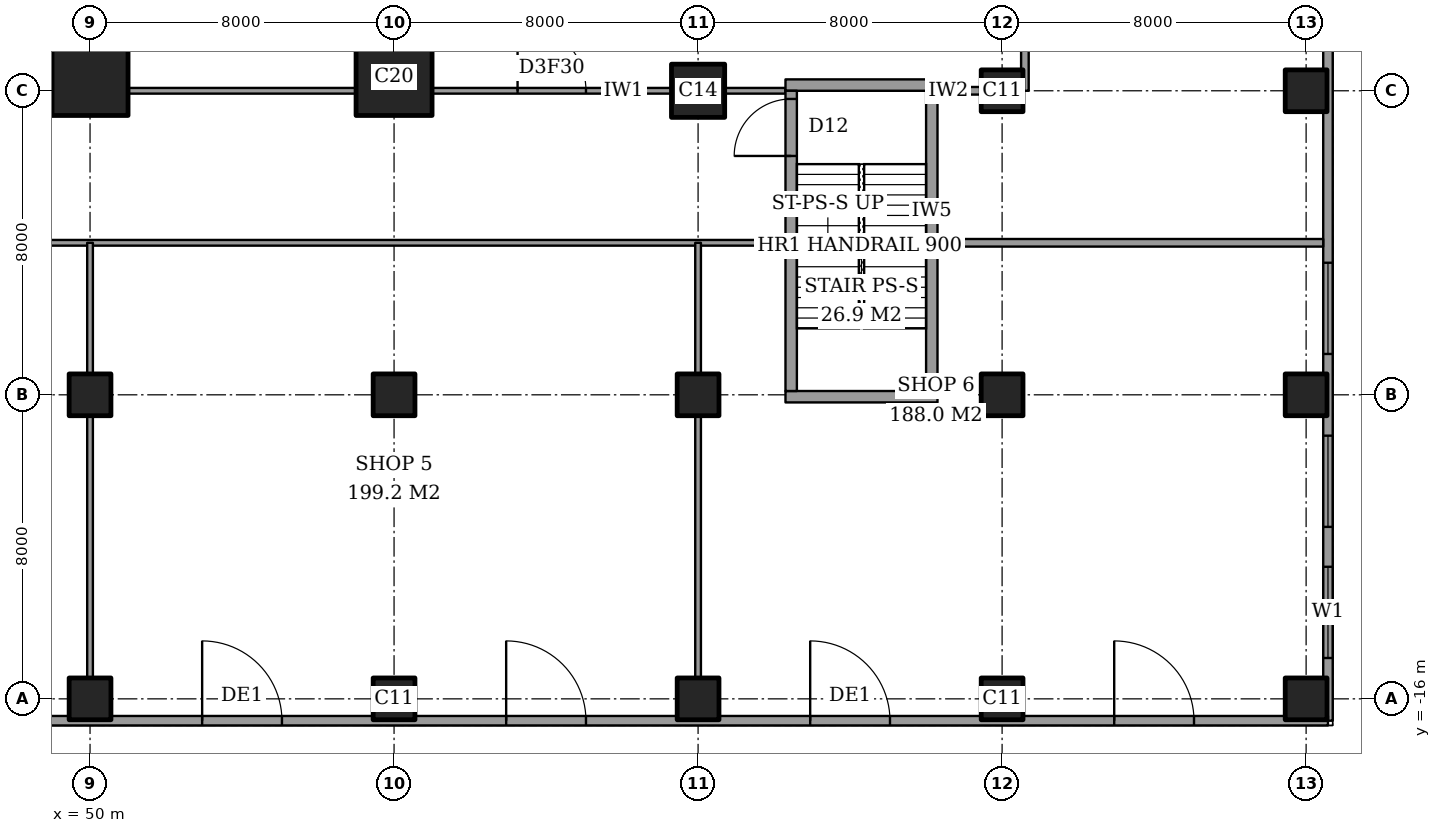
"""IFC4 building model, lengths in metres.
Left out: names, types, materials, properties, quantities, classifications, styles, units other than length and angle.
Written with IfcOpenShell. Run it as: python <this file> out.ifc"""

import sys

from ifc_helpers import new_model, si_unit, direction, frame, frame_2d, origin, origin_2d, place, context, subcontext, project, spatial, rectangle, extrude, element, fill, save


model = new_model("IFC4")
c1 = context("Model", 3, precision=1e-05, world=origin(), true_north=direction((0.0, 1.0)))
c2 = subcontext(c1, "Body", "Model", "MODEL_VIEW")
j1 = project(units=[si_unit("LENGTHUNIT", "METRE"), si_unit("PLANEANGLEUNIT", "RADIAN")], contexts=[c1])
p1 = place(None, origin())
s1 = spatial("IfcSite", under=j1, at=p1, CompositionType="ELEMENT")
p2 = place(p1, origin())
s2 = spatial("IfcBuilding", under=s1, at=p2, CompositionType="ELEMENT")
p3 = place(p2, origin())
s3 = spatial("IfcBuildingStorey", under=s2, at=p3, CompositionType="ELEMENT", Elevation=0.0)
for number, where, z_axis, x_axis in (
    (1, (50.0, -16.0, 0.0), (0.0, 0.0, 1.0), (1.0, 0.0, 0.0)),
    (2, (50.0, -8.0, 0.0), (0.0, 0.0, 1.0), (1.0, 0.0, 0.0)),
):
    element("IfcColumn", number, at=place(p3, frame(where, z_axis=z_axis, x_axis=x_axis)), inside=s3, PredefinedType="COLUMN", context=c2, shape_type="SweptSolid", body=[
        extrude(rectangle(XDim=1.1, YDim=1.1, at=origin_2d()), origin(), (0.0, 0.0, 1.0), 6.0),
    ])
p4 = place(p3, frame((50.0, 0.35, 0.0), z_axis=(0.0, 0.0, 1.0), x_axis=(1.0, 0.0, 0.0)))
e3 = element("IfcColumn", 3, at=p4, inside=s3, PredefinedType="COLUMN", context=c2, shape_type="SweptSolid", body=[
    extrude(rectangle(XDim=2.0, YDim=2.0, at=origin_2d()), origin(), (0.0, 0.0, 1.0), 6.0),
])
for number, where, z_axis, x_axis in (
    (4, (58.0, -16.0, 0.0), (0.0, 0.0, 1.0), (1.0, 0.0, 0.0)),
    (5, (58.0, -8.0, 0.0), (0.0, 0.0, 1.0), (1.0, 0.0, 0.0)),
):
    element("IfcColumn", number, at=place(p3, frame(where, z_axis=z_axis, x_axis=x_axis)), inside=s3, PredefinedType="COLUMN", context=c2, shape_type="SweptSolid", body=[
        extrude(rectangle(XDim=1.1, YDim=1.1, at=origin_2d()), origin(), (0.0, 0.0, 1.0), 6.0),
    ])
p5 = place(p3, frame((58.0, 0.35, 0.0), z_axis=(0.0, 0.0, 1.0), x_axis=(1.0, 0.0, 0.0)))
e6 = element("IfcColumn", 6, at=p5, inside=s3, PredefinedType="COLUMN", context=c2, shape_type="SweptSolid", body=[
    extrude(rectangle(XDim=2.0, YDim=2.0, at=origin_2d()), origin(), (0.0, 0.0, 1.0), 6.0),
])
for number, where, z_axis, x_axis in (
    (7, (66.0, -16.0, 0.0), (0.0, 0.0, 1.0), (1.0, 0.0, 0.0)),
    (8, (66.0, -8.0, 0.0), (0.0, 0.0, 1.0), (1.0, 0.0, 0.0)),
):
    element("IfcColumn", number, at=place(p3, frame(where, z_axis=z_axis, x_axis=x_axis)), inside=s3, PredefinedType="COLUMN", context=c2, shape_type="SweptSolid", body=[
        extrude(rectangle(XDim=1.1, YDim=1.1, at=origin_2d()), origin(), (0.0, 0.0, 1.0), 6.0),
    ])
p6 = place(p3, frame((66.0, 0.0, 0.0), z_axis=(0.0, 0.0, 1.0), x_axis=(1.0, 0.0, 0.0)))
e9 = element("IfcColumn", 9, at=p6, inside=s3, PredefinedType="COLUMN", context=c2, shape_type="SweptSolid", body=[
    extrude(rectangle(XDim=1.4, YDim=1.4, at=origin_2d()), origin(), (0.0, 0.0, 1.0), 6.0),
])
for number, where, z_axis, x_axis in (
    (10, (74.0, -16.0, 0.0), (0.0, 0.0, 1.0), (1.0, 0.0, 0.0)),
    (11, (74.0, -8.0, 0.0), (0.0, 0.0, 1.0), (1.0, 0.0, 0.0)),
    (12, (74.0, 0.0, 0.0), (0.0, 0.0, 1.0), (1.0, 0.0, 0.0)),
    (13, (82.0, -16.0, 0.0), (0.0, 0.0, 1.0), (1.0, 0.0, 0.0)),
    (14, (82.0, -8.0, 0.0), (0.0, 0.0, 1.0), (1.0, 0.0, 0.0)),
    (15, (82.0, 0.0, 0.0), (0.0, 0.0, 1.0), (1.0, 0.0, 0.0)),
):
    element("IfcColumn", number, at=place(p3, frame(where, z_axis=z_axis, x_axis=x_axis)), inside=s3, PredefinedType="COLUMN", context=c2, shape_type="SweptSolid", body=[
        extrude(rectangle(XDim=1.1, YDim=1.1, at=origin_2d()), origin(), (0.0, 0.0, 1.0), 6.0),
    ])
p7 = place(p3, frame((82.575, -16.575, 0.0), z_axis=(0.0, 0.0, 1.0), x_axis=(0.0, 1.0, 0.0)))
e16 = element("IfcWall", 16, at=p7, inside=s3, PredefinedType="SOLIDWALL", context=c2, shape_type="SweptSolid", body=[
    extrude(rectangle(XDim=52.45, YDim=0.25, at=frame_2d((26.225, 0.0))), origin(), (0.0, 0.0, 1.0), 6.0),
])
p8 = place(p7, frame((1.65, 0.0, 0.3)))
e17 = element("IfcOpeningElement", 17, at=p8, cuts=e16, PredefinedType="OPENING", context=c2, shape_type="SweptSolid", body=[
    extrude(rectangle(XDim=2.4, YDim=3.6, at=frame_2d((1.2, 1.8))), frame((0.0, 0.135, 0.0), z_axis=(0.0, -1.0, 0.0), x_axis=(1.0, 0.0, 0.0)), (0.0, 0.0, 1.0), 0.27),
])
p9 = place(p7, frame((5.1, 0.0, 0.3)))
e18 = element("IfcOpeningElement", 18, at=p9, cuts=e16, PredefinedType="OPENING", context=c2, shape_type="SweptSolid", body=[
    extrude(rectangle(XDim=2.4, YDim=3.6, at=frame_2d((1.2, 1.8))), frame((0.0, 0.135, 0.0), z_axis=(0.0, -1.0, 0.0), x_axis=(1.0, 0.0, 0.0)), (0.0, 0.0, 1.0), 0.27),
])
p10 = place(p7, frame((9.65, 0.0, 0.3)))
e19 = element("IfcOpeningElement", 19, at=p10, cuts=e16, PredefinedType="OPENING", context=c2, shape_type="SweptSolid", body=[
    extrude(rectangle(XDim=2.4, YDim=3.6, at=frame_2d((1.2, 1.8))), frame((0.0, 0.135, 0.0), z_axis=(0.0, -1.0, 0.0), x_axis=(1.0, 0.0, 0.0)), (0.0, 0.0, 1.0), 0.27),
])
p11 = place(p3, frame((-16.575, -16.575, 0.0), z_axis=(0.0, 0.0, 1.0), x_axis=(1.0, 0.0, 0.0)))
e20 = element("IfcWall", 20, at=p11, inside=s3, PredefinedType="SOLIDWALL", context=c2, shape_type="SweptSolid", body=[
    extrude(rectangle(XDim=99.15, YDim=0.25, at=frame_2d((49.575, 0.0))), origin(), (0.0, 0.0, 1.0), 6.0),
])
p12 = place(p11, frame((3.525, 0.0, 0.0)))
e21 = element("IfcOpeningElement", 21, at=p12, cuts=e20, PredefinedType="OPENING", context=c2, shape_type="SweptSolid", body=[
    extrude(rectangle(XDim=2.1, YDim=2.4, at=frame_2d((1.05, 1.2))), frame((0.0, 0.135, 0.0), z_axis=(0.0, -1.0, 0.0), x_axis=(1.0, 0.0, 0.0)), (0.0, 0.0, 1.0), 0.27),
])
p13 = place(p11, frame((11.525, 0.0, 0.0)))
e22 = element("IfcOpeningElement", 22, at=p13, cuts=e20, PredefinedType="OPENING", context=c2, shape_type="SweptSolid", body=[
    extrude(rectangle(XDim=2.1, YDim=2.4, at=frame_2d((1.05, 1.2))), frame((0.0, 0.135, 0.0), z_axis=(0.0, -1.0, 0.0), x_axis=(1.0, 0.0, 0.0)), (0.0, 0.0, 1.0), 0.27),
])
p14 = place(p11, frame((19.525, 0.0, 0.0)))
e23 = element("IfcOpeningElement", 23, at=p14, cuts=e20, PredefinedType="OPENING", context=c2, shape_type="SweptSolid", body=[
    extrude(rectangle(XDim=2.1, YDim=2.4, at=frame_2d((1.05, 1.2))), frame((0.0, 0.135, 0.0), z_axis=(0.0, -1.0, 0.0), x_axis=(1.0, 0.0, 0.0)), (0.0, 0.0, 1.0), 0.27),
])
p15 = place(p11, frame((27.525, 0.0, 0.0)))
e24 = element("IfcOpeningElement", 24, at=p15, cuts=e20, PredefinedType="OPENING", context=c2, shape_type="SweptSolid", body=[
    extrude(rectangle(XDim=2.1, YDim=2.4, at=frame_2d((1.05, 1.2))), frame((0.0, 0.135, 0.0), z_axis=(0.0, -1.0, 0.0), x_axis=(1.0, 0.0, 0.0)), (0.0, 0.0, 1.0), 0.27),
])
p16 = place(p11, frame((35.525, 0.0, 0.0)))
e25 = element("IfcOpeningElement", 25, at=p16, cuts=e20, PredefinedType="OPENING", context=c2, shape_type="SweptSolid", body=[
    extrude(rectangle(XDim=2.1, YDim=2.4, at=frame_2d((1.05, 1.2))), frame((0.0, 0.135, 0.0), z_axis=(0.0, -1.0, 0.0), x_axis=(1.0, 0.0, 0.0)), (0.0, 0.0, 1.0), 0.27),
])
p17 = place(p11, frame((44.025, 0.0, 0.0)))
e26 = element("IfcOpeningElement", 26, at=p17, cuts=e20, PredefinedType="OPENING", context=c2, shape_type="SweptSolid", body=[
    extrude(rectangle(XDim=2.1, YDim=2.4, at=frame_2d((1.05, 1.2))), frame((0.0, 0.135, 0.0), z_axis=(0.0, -1.0, 0.0), x_axis=(1.0, 0.0, 0.0)), (0.0, 0.0, 1.0), 0.27),
])
p18 = place(p11, frame((42.5, 0.0, 0.3)))
e27 = element("IfcOpeningElement", 27, at=p18, cuts=e20, PredefinedType="OPENING", context=c2, shape_type="SweptSolid", body=[
    extrude(rectangle(XDim=1.2, YDim=3.6, at=frame_2d((0.6, 1.8))), frame((0.0, 0.135, 0.0), z_axis=(0.0, -1.0, 0.0), x_axis=(1.0, 0.0, 0.0)), (0.0, 0.0, 1.0), 0.27),
])
p19 = place(p11, frame((46.45, 0.0, 0.3)))
e28 = element("IfcOpeningElement", 28, at=p19, cuts=e20, PredefinedType="OPENING", context=c2, shape_type="SweptSolid", body=[
    extrude(rectangle(XDim=1.2, YDim=3.6, at=frame_2d((0.6, 1.8))), frame((0.0, 0.135, 0.0), z_axis=(0.0, -1.0, 0.0), x_axis=(1.0, 0.0, 0.0)), (0.0, 0.0, 1.0), 0.27),
])
p20 = place(p11, frame((53.025, 0.0, 0.0)))
e29 = element("IfcOpeningElement", 29, at=p20, cuts=e20, PredefinedType="OPENING", context=c2, shape_type="SweptSolid", body=[
    extrude(rectangle(XDim=2.1, YDim=2.4, at=frame_2d((1.05, 1.2))), frame((0.0, 0.135, 0.0), z_axis=(0.0, -1.0, 0.0), x_axis=(1.0, 0.0, 0.0)), (0.0, 0.0, 1.0), 0.27),
])
p21 = place(p11, frame((61.525, 0.0, 0.0)))
e30 = element("IfcOpeningElement", 30, at=p21, cuts=e20, PredefinedType="OPENING", context=c2, shape_type="SweptSolid", body=[
    extrude(rectangle(XDim=2.1, YDim=2.4, at=frame_2d((1.05, 1.2))), frame((0.0, 0.135, 0.0), z_axis=(0.0, -1.0, 0.0), x_axis=(1.0, 0.0, 0.0)), (0.0, 0.0, 1.0), 0.27),
])
p22 = place(p11, frame((51.5, 0.0, 0.3)))
e31 = element("IfcOpeningElement", 31, at=p22, cuts=e20, PredefinedType="OPENING", context=c2, shape_type="SweptSolid", body=[
    extrude(rectangle(XDim=1.2, YDim=3.6, at=frame_2d((0.6, 1.8))), frame((0.0, 0.135, 0.0), z_axis=(0.0, -1.0, 0.0), x_axis=(1.0, 0.0, 0.0)), (0.0, 0.0, 1.0), 0.27),
])
p23 = place(p11, frame((55.45, 0.0, 0.3)))
e32 = element("IfcOpeningElement", 32, at=p23, cuts=e20, PredefinedType="OPENING", context=c2, shape_type="SweptSolid", body=[
    extrude(rectangle(XDim=1.2, YDim=3.6, at=frame_2d((0.6, 1.8))), frame((0.0, 0.135, 0.0), z_axis=(0.0, -1.0, 0.0), x_axis=(1.0, 0.0, 0.0)), (0.0, 0.0, 1.0), 0.27),
])
p24 = place(p11, frame((69.525, 0.0, 0.0)))
e33 = element("IfcOpeningElement", 33, at=p24, cuts=e20, PredefinedType="OPENING", context=c2, shape_type="SweptSolid", body=[
    extrude(rectangle(XDim=2.1, YDim=2.4, at=frame_2d((1.05, 1.2))), frame((0.0, 0.135, 0.0), z_axis=(0.0, -1.0, 0.0), x_axis=(1.0, 0.0, 0.0)), (0.0, 0.0, 1.0), 0.27),
])
p25 = place(p11, frame((77.525, 0.0, 0.0)))
e34 = element("IfcOpeningElement", 34, at=p25, cuts=e20, PredefinedType="OPENING", context=c2, shape_type="SweptSolid", body=[
    extrude(rectangle(XDim=2.1, YDim=2.4, at=frame_2d((1.05, 1.2))), frame((0.0, 0.135, 0.0), z_axis=(0.0, -1.0, 0.0), x_axis=(1.0, 0.0, 0.0)), (0.0, 0.0, 1.0), 0.27),
])
p26 = place(p11, frame((85.525, 0.0, 0.0)))
e35 = element("IfcOpeningElement", 35, at=p26, cuts=e20, PredefinedType="OPENING", context=c2, shape_type="SweptSolid", body=[
    extrude(rectangle(XDim=2.1, YDim=2.4, at=frame_2d((1.05, 1.2))), frame((0.0, 0.135, 0.0), z_axis=(0.0, -1.0, 0.0), x_axis=(1.0, 0.0, 0.0)), (0.0, 0.0, 1.0), 0.27),
])
p27 = place(p11, frame((93.525, 0.0, 0.0)))
e36 = element("IfcOpeningElement", 36, at=p27, cuts=e20, PredefinedType="OPENING", context=c2, shape_type="SweptSolid", body=[
    extrude(rectangle(XDim=2.1, YDim=2.4, at=frame_2d((1.05, 1.2))), frame((0.0, 0.135, 0.0), z_axis=(0.0, -1.0, 0.0), x_axis=(1.0, 0.0, 0.0)), (0.0, 0.0, 1.0), 0.27),
])
p28 = place(p3, frame((72.3, -4.0, 0.0), z_axis=(0.0, 0.0, 1.0), x_axis=(1.0, 0.0, 0.0)))
e37 = element("IfcWall", 37, at=p28, inside=s3, PredefinedType="PARTITIONING", context=c2, shape_type="SweptSolid", body=[
    extrude(rectangle(XDim=10.15, YDim=0.2, at=frame_2d((5.075, 0.0))), origin(), (0.0, 0.0, 1.0), 5.7),
])
p29 = place(p3, frame((-16.45, -4.0, 0.0), z_axis=(0.0, 0.0, 1.0), x_axis=(1.0, 0.0, 0.0)))
e38 = element("IfcWall", 38, at=p29, inside=s3, PredefinedType="PARTITIONING", context=c2, shape_type="SweptSolid", body=[
    extrude(rectangle(XDim=84.75, YDim=0.15, at=frame_2d((42.375, 0.0))), origin(), (0.0, 0.0, 1.0), 5.7),
])
p30 = place(p3, frame((72.3, 0.0, 0.0), z_axis=(0.0, 0.0, 1.0), x_axis=(1.0, 0.0, 0.0)))
e39 = element("IfcWall", 39, at=p30, inside=s3, PredefinedType="PARTITIONING", context=c2, shape_type="SweptSolid", body=[
    extrude(rectangle(XDim=1.15, YDim=0.2, at=frame_2d((0.575, 0.0))), origin(), (0.0, 0.0, 1.0), 5.7),
])
p31 = place(p3, frame((51.0, 0.0, 0.0), z_axis=(0.0, 0.0, 1.0), x_axis=(1.0, 0.0, 0.0)))
e40 = element("IfcWall", 40, at=p31, inside=s3, PredefinedType="PARTITIONING", context=c2, shape_type="SweptSolid", body=[
    extrude(rectangle(XDim=6.0, YDim=0.15, at=frame_2d((3.0, 0.0))), origin(), (0.0, 0.0, 1.0), 4.3),
])
p32 = place(p3, frame((59.0, 0.0, 0.0), z_axis=(0.0, 0.0, 1.0), x_axis=(1.0, 0.0, 0.0)))
e41 = element("IfcWall", 41, at=p32, inside=s3, PredefinedType="PARTITIONING", context=c2, shape_type="SweptSolid", body=[
    extrude(rectangle(XDim=6.3, YDim=0.15, at=frame_2d((3.15, 0.0))), origin(), (0.0, 0.0, 1.0), 4.3),
])
p33 = place(p32, frame((2.25, 0.0, 0.0)))
e42 = element("IfcOpeningElement", 42, at=p33, cuts=e41, PredefinedType="OPENING", context=c2, shape_type="SweptSolid", body=[
    extrude(rectangle(XDim=1.8, YDim=2.1, at=frame_2d((0.9, 1.05))), frame((0.0, 0.085, 0.0), z_axis=(0.0, -1.0, 0.0), x_axis=(1.0, 0.0, 0.0)), (0.0, 0.0, 1.0), 0.17),
])
p34 = place(p3, frame((66.7, 0.0, 0.0), z_axis=(0.0, 0.0, 1.0), x_axis=(1.0, 0.0, 0.0)))
e43 = element("IfcWall", 43, at=p34, inside=s3, PredefinedType="PARTITIONING", context=c2, shape_type="SweptSolid", body=[
    extrude(rectangle(XDim=1.6, YDim=0.15, at=frame_2d((0.8, 0.0))), origin(), (0.0, 0.0, 1.0), 5.7),
])
p35 = place(p3, frame((50.0, -15.45, 0.0), z_axis=(0.0, 0.0, 1.0), x_axis=(0.0, 1.0, 0.0)))
e44 = element("IfcWall", 44, at=p35, inside=s3, PredefinedType="PARTITIONING", context=c2, shape_type="SweptSolid", body=[
    extrude(rectangle(XDim=6.9, YDim=0.15, at=frame_2d((3.45, 0.0))), origin(), (0.0, 0.0, 1.0), 4.3),
])
p36 = place(p3, frame((50.0, -7.45, 0.0), z_axis=(0.0, 0.0, 1.0), x_axis=(0.0, 1.0, 0.0)))
e45 = element("IfcWall", 45, at=p36, inside=s3, PredefinedType="PARTITIONING", context=c2, shape_type="SweptSolid", body=[
    extrude(rectangle(XDim=3.45, YDim=0.15, at=frame_2d((1.725, 0.0))), origin(), (0.0, 0.0, 1.0), 4.3),
])
p37 = place(p3, frame((66.0, -15.45, 0.0), z_axis=(0.0, 0.0, 1.0), x_axis=(0.0, 1.0, 0.0)))
e46 = element("IfcWall", 46, at=p37, inside=s3, PredefinedType="PARTITIONING", context=c2, shape_type="SweptSolid", body=[
    extrude(rectangle(XDim=6.9, YDim=0.15, at=frame_2d((3.45, 0.0))), origin(), (0.0, 0.0, 1.0), 4.3),
])
p38 = place(p3, frame((66.0, -7.45, 0.0), z_axis=(0.0, 0.0, 1.0), x_axis=(0.0, 1.0, 0.0)))
e47 = element("IfcWall", 47, at=p38, inside=s3, PredefinedType="PARTITIONING", context=c2, shape_type="SweptSolid", body=[
    extrude(rectangle(XDim=3.45, YDim=0.15, at=frame_2d((1.725, 0.0))), origin(), (0.0, 0.0, 1.0), 4.3),
])
p39 = place(p3, frame((74.6, 0.0, 0.0), z_axis=(0.0, 0.0, 1.0), x_axis=(0.0, 1.0, 0.0)))
e48 = element("IfcWall", 48, at=p39, inside=s3, PredefinedType="PARTITIONING", context=c2, shape_type="SweptSolid", body=[
    extrude(rectangle(XDim=48.45, YDim=0.2, at=frame_2d((24.225, 0.0))), origin(), (0.0, 0.0, 1.0), 5.7),
])
for number, where, z_axis, x_axis in (
    (49, (68.3, -8.05, 0.0), (0.0, 0.0, 1.0), (1.0, 0.0, 0.0)),
    (50, (68.3, 0.15, 0.0), (0.0, 0.0, 1.0), (1.0, 0.0, 0.0)),
):
    element("IfcWall", number, at=place(p3, frame(where, z_axis=z_axis, x_axis=x_axis)), inside=s3, PredefinedType="PARTITIONING", context=c2, shape_type="SweptSolid", body=[
        extrude(rectangle(XDim=4.0, YDim=0.3, at=frame_2d((2.0, 0.0))), origin(), (0.0, 0.0, 1.0), 6.0),
    ])
p40 = place(p3, frame((68.45, -7.9, 0.0), z_axis=(0.0, 0.0, 1.0), x_axis=(0.0, 1.0, 0.0)))
e51 = element("IfcWall", 51, at=p40, inside=s3, PredefinedType="PARTITIONING", context=c2, shape_type="SweptSolid", body=[
    extrude(rectangle(XDim=7.9, YDim=0.3, at=frame_2d((3.95, 0.0))), origin(), (0.0, 0.0, 1.0), 6.0),
])
p41 = place(p40, frame((6.185, 0.0, 0.0)))
e52 = element("IfcOpeningElement", 52, at=p41, cuts=e51, PredefinedType="OPENING", context=c2, shape_type="SweptSolid", body=[
    extrude(rectangle(XDim=1.5, YDim=2.1, at=frame_2d((0.75, 1.05))), frame((0.0, 0.16, 0.0), z_axis=(0.0, -1.0, 0.0), x_axis=(1.0, 0.0, 0.0)), (0.0, 0.0, 1.0), 0.32),
])
p42 = place(p3, frame((72.15, -7.9, 0.0), z_axis=(0.0, 0.0, 1.0), x_axis=(0.0, 1.0, 0.0)))
e53 = element("IfcWall", 53, at=p42, inside=s3, PredefinedType="PARTITIONING", context=c2, shape_type="SweptSolid", body=[
    extrude(rectangle(XDim=7.9, YDim=0.3, at=frame_2d((3.95, 0.0))), origin(), (0.0, 0.0, 1.0), 6.0),
])
p43 = place(p8, origin())
e54 = element("IfcWindow", 54, at=p43, inside=s3, PartitioningType="SINGLE_PANEL", PredefinedType="WINDOW", context=c2, shape_type="SweptSolid", body=[
    extrude(rectangle(XDim=2.4, YDim=3.6, at=frame_2d((1.2, 1.8))), frame((0.0, 0.03, 0.0), z_axis=(0.0, -1.0, 0.0), x_axis=(1.0, 0.0, 0.0)), (0.0, 0.0, 1.0), 0.06),
])
fill(e17, e54)
p44 = place(p9, origin())
e55 = element("IfcWindow", 55, at=p44, inside=s3, PartitioningType="SINGLE_PANEL", PredefinedType="WINDOW", context=c2, shape_type="SweptSolid", body=[
    extrude(rectangle(XDim=2.4, YDim=3.6, at=frame_2d((1.2, 1.8))), frame((0.0, 0.03, 0.0), z_axis=(0.0, -1.0, 0.0), x_axis=(1.0, 0.0, 0.0)), (0.0, 0.0, 1.0), 0.06),
])
fill(e18, e55)
p45 = place(p10, origin())
e56 = element("IfcWindow", 56, at=p45, inside=s3, PartitioningType="SINGLE_PANEL", PredefinedType="WINDOW", context=c2, shape_type="SweptSolid", body=[
    extrude(rectangle(XDim=2.4, YDim=3.6, at=frame_2d((1.2, 1.8))), frame((0.0, 0.03, 0.0), z_axis=(0.0, -1.0, 0.0), x_axis=(1.0, 0.0, 0.0)), (0.0, 0.0, 1.0), 0.06),
])
fill(e19, e56)
p46 = place(p24, origin())
e57 = element("IfcDoor", 57, at=p46, inside=s3, OperationType="DOUBLE_DOOR_DOUBLE_SWING", PredefinedType="DOOR", context=c2, shape_type="SweptSolid", body=[
    extrude(rectangle(XDim=2.1, YDim=2.4, at=frame_2d((1.05, 1.2))), frame((0.0, 0.025, 0.0), z_axis=(0.0, -1.0, 0.0), x_axis=(1.0, 0.0, 0.0)), (0.0, 0.0, 1.0), 0.05),
])
fill(e33, e57)
p47 = place(p25, origin())
e58 = element("IfcDoor", 58, at=p47, inside=s3, OperationType="DOUBLE_DOOR_DOUBLE_SWING", PredefinedType="DOOR", context=c2, shape_type="SweptSolid", body=[
    extrude(rectangle(XDim=2.1, YDim=2.4, at=frame_2d((1.05, 1.2))), frame((0.0, 0.025, 0.0), z_axis=(0.0, -1.0, 0.0), x_axis=(1.0, 0.0, 0.0)), (0.0, 0.0, 1.0), 0.05),
])
fill(e34, e58)
p48 = place(p26, origin())
e59 = element("IfcDoor", 59, at=p48, inside=s3, OperationType="DOUBLE_DOOR_DOUBLE_SWING", PredefinedType="DOOR", context=c2, shape_type="SweptSolid", body=[
    extrude(rectangle(XDim=2.1, YDim=2.4, at=frame_2d((1.05, 1.2))), frame((0.0, 0.025, 0.0), z_axis=(0.0, -1.0, 0.0), x_axis=(1.0, 0.0, 0.0)), (0.0, 0.0, 1.0), 0.05),
])
fill(e35, e59)
p49 = place(p27, origin())
e60 = element("IfcDoor", 60, at=p49, inside=s3, OperationType="DOUBLE_DOOR_DOUBLE_SWING", PredefinedType="DOOR", context=c2, shape_type="SweptSolid", body=[
    extrude(rectangle(XDim=2.1, YDim=2.4, at=frame_2d((1.05, 1.2))), frame((0.0, 0.025, 0.0), z_axis=(0.0, -1.0, 0.0), x_axis=(1.0, 0.0, 0.0)), (0.0, 0.0, 1.0), 0.05),
])
fill(e36, e60)
p50 = place(p33, origin())
e61 = element("IfcDoor", 61, at=p50, inside=s3, OperationType="DOUBLE_DOOR_DOUBLE_SWING", PredefinedType="DOOR", context=c2, shape_type="SweptSolid", body=[
    extrude(rectangle(XDim=1.8, YDim=2.1, at=frame_2d((0.9, 1.05))), frame((0.0, 0.025, 0.0), z_axis=(0.0, -1.0, 0.0), x_axis=(1.0, 0.0, 0.0)), (0.0, 0.0, 1.0), 0.05),
])
fill(e42, e61)
p51 = place(p41, origin())
e62 = element("IfcDoor", 62, at=p51, inside=s3, OperationType="DOUBLE_DOOR_SINGLE_SWING", PredefinedType="DOOR", context=c2, shape_type="SweptSolid", body=[
    extrude(rectangle(XDim=1.5, YDim=2.1, at=frame_2d((0.75, 1.05))), frame((0.0, 0.025, 0.0), z_axis=(0.0, -1.0, 0.0), x_axis=(1.0, 0.0, 0.0)), (0.0, 0.0, 1.0), 0.05),
])
fill(e52, e62)
save(model, sys.argv[1])
